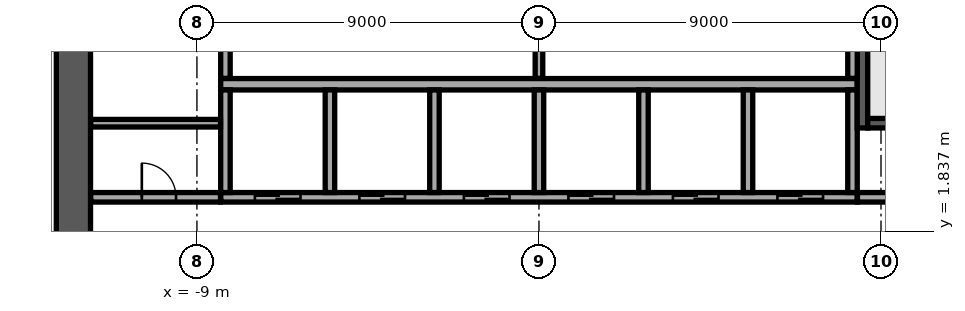
"""IFC4 building model, lengths in metres.
Left out: names, types, materials, properties, quantities, classifications, styles, units other than length and angle.
Written with IfcOpenShell. Run it as: python <this file> out.ifc"""

import sys

from ifc_helpers import new_model, si_unit, direction, frame, frame_2d, origin, place, context, subcontext, project, spatial, rectangle, extrude, element, fill, save


model = new_model("IFC4")
c1 = context("Model", 3, precision=1e-05, world=origin(), true_north=direction((0.0, 1.0)))
c2 = subcontext(c1, "Body", "Model", "MODEL_VIEW")
j1 = project(units=[si_unit("LENGTHUNIT", "METRE"), si_unit("PLANEANGLEUNIT", "RADIAN")], contexts=[c1])
p1 = place(None, origin())
s1 = spatial("IfcSite", under=j1, at=p1, CompositionType="ELEMENT")
p2 = place(p1, origin())
s2 = spatial("IfcBuilding", under=s1, at=p2, CompositionType="ELEMENT")
p3 = place(p2, frame((0.0, 0.0, 217.3)))
s3 = spatial("IfcBuildingStorey", under=s2, at=p3, CompositionType="ELEMENT", Elevation=217.3)
p4 = place(p3, frame((-12.25, -11.8, 0.0), z_axis=(0.0, 0.0, 1.0), x_axis=(0.0, 1.0, 0.0)))
e1 = element("IfcWall", 1, at=p4, inside=s3, PredefinedType="SHEAR", context=c2, shape_type="SweptSolid", body=[
    extrude(rectangle(XDim=23.6, YDim=0.9, at=frame_2d((11.8, 0.0))), origin(), (0.0, 0.0, 1.0), 3.62),
])
p5 = place(p4, frame((10.6, 0.0, 0.0)))
e2 = element("IfcOpeningElement", 2, at=p5, cuts=e1, PredefinedType="OPENING", context=c2, shape_type="SweptSolid", body=[
    extrude(rectangle(XDim=2.4, YDim=2.4, at=frame_2d((1.2, 1.2))), frame((0.0, 0.46, 0.0), z_axis=(0.0, -1.0, 0.0), x_axis=(1.0, 0.0, 0.0)), (0.0, 0.0, 1.0), 0.92),
])
p6 = place(p3, frame((-8.375, 5.7, 0.0), z_axis=(0.0, 0.0, 1.0), x_axis=(1.0, 0.0, 0.0)))
e3 = element("IfcWall", 3, at=p6, inside=s3, PredefinedType="SOLIDWALL", context=c2, shape_type="SweptSolid", body=[
    extrude(rectangle(XDim=16.75, YDim=0.3, at=frame_2d((8.375, 0.0))), origin(), (0.0, 0.0, 1.0), 3.62),
])
p7 = place(p3, frame((-8.375, 2.725, 0.0), z_axis=(0.0, 0.0, 1.0), x_axis=(1.0, 0.0, 0.0)))
e4 = element("IfcWall", 4, at=p7, inside=s3, PredefinedType="SOLIDWALL", context=c2, shape_type="SweptSolid", body=[
    extrude(rectangle(XDim=16.75, YDim=0.25, at=frame_2d((8.375, 0.0))), origin(), (0.0, 0.0, 1.0), 3.62),
])
p8 = place(p7, frame((0.9, 0.0, 0.0)))
e5 = element("IfcOpeningElement", 5, at=p8, cuts=e4, PredefinedType="OPENING", context=c2, shape_type="SweptSolid", body=[
    extrude(rectangle(XDim=1.2, YDim=2.1, at=frame_2d((0.6, 1.05))), frame((0.0, 0.135, 0.0), z_axis=(0.0, -1.0, 0.0), x_axis=(1.0, 0.0, 0.0)), (0.0, 0.0, 1.0), 0.27),
])
p9 = place(p7, frame((3.65, 0.0, 0.0)))
e6 = element("IfcOpeningElement", 6, at=p9, cuts=e4, PredefinedType="OPENING", context=c2, shape_type="SweptSolid", body=[
    extrude(rectangle(XDim=1.2, YDim=2.1, at=frame_2d((0.6, 1.05))), frame((0.0, 0.135, 0.0), z_axis=(0.0, -1.0, 0.0), x_axis=(1.0, 0.0, 0.0)), (0.0, 0.0, 1.0), 0.27),
])
p10 = place(p7, frame((6.4, 0.0, 0.0)))
e7 = element("IfcOpeningElement", 7, at=p10, cuts=e4, PredefinedType="OPENING", context=c2, shape_type="SweptSolid", body=[
    extrude(rectangle(XDim=1.2, YDim=2.1, at=frame_2d((0.6, 1.05))), frame((0.0, 0.135, 0.0), z_axis=(0.0, -1.0, 0.0), x_axis=(1.0, 0.0, 0.0)), (0.0, 0.0, 1.0), 0.27),
])
p11 = place(p7, frame((9.15, 0.0, 0.0)))
e8 = element("IfcOpeningElement", 8, at=p11, cuts=e4, PredefinedType="OPENING", context=c2, shape_type="SweptSolid", body=[
    extrude(rectangle(XDim=1.2, YDim=2.1, at=frame_2d((0.6, 1.05))), frame((0.0, 0.135, 0.0), z_axis=(0.0, -1.0, 0.0), x_axis=(1.0, 0.0, 0.0)), (0.0, 0.0, 1.0), 0.27),
])
p12 = place(p7, frame((11.9, 0.0, 0.0)))
e9 = element("IfcOpeningElement", 9, at=p12, cuts=e4, PredefinedType="OPENING", context=c2, shape_type="SweptSolid", body=[
    extrude(rectangle(XDim=1.2, YDim=2.1, at=frame_2d((0.6, 1.05))), frame((0.0, 0.135, 0.0), z_axis=(0.0, -1.0, 0.0), x_axis=(1.0, 0.0, 0.0)), (0.0, 0.0, 1.0), 0.27),
])
p13 = place(p7, frame((14.65, 0.0, 0.0)))
e10 = element("IfcOpeningElement", 10, at=p13, cuts=e4, PredefinedType="OPENING", context=c2, shape_type="SweptSolid", body=[
    extrude(rectangle(XDim=1.2, YDim=2.1, at=frame_2d((0.6, 1.05))), frame((0.0, 0.135, 0.0), z_axis=(0.0, -1.0, 0.0), x_axis=(1.0, 0.0, 0.0)), (0.0, 0.0, 1.0), 0.27),
])
for number, where, z_axis, x_axis in (
    (11, (-8.25, 2.85, 0.0), (0.0, 0.0, 1.0), (0.0, 1.0, 0.0)),
    (12, (-5.5, 2.85, 0.0), (0.0, 0.0, 1.0), (0.0, 1.0, 0.0)),
    (13, (-2.75, 2.85, 0.0), (0.0, 0.0, 1.0), (0.0, 1.0, 0.0)),
    (14, (0.0, 2.85, 0.0), (0.0, 0.0, 1.0), (0.0, 1.0, 0.0)),
    (15, (2.75, 2.85, 0.0), (0.0, 0.0, 1.0), (0.0, 1.0, 0.0)),
    (16, (5.5, 2.85, 0.0), (0.0, 0.0, 1.0), (0.0, 1.0, 0.0)),
    (17, (8.25, 2.85, 0.0), (0.0, 0.0, 1.0), (0.0, 1.0, 0.0)),
):
    element("IfcWall", number, at=place(p3, frame(where, z_axis=z_axis, x_axis=x_axis)), inside=s3, PredefinedType="SOLIDWALL", context=c2, shape_type="SweptSolid", body=[
        extrude(rectangle(XDim=2.7, YDim=0.25, at=frame_2d((1.35, 0.0))), origin(), (0.0, 0.0, 1.0), 3.62),
    ])
p14 = place(p3, frame((8.512, 4.55, 0.0), z_axis=(0.0, 0.0, 1.0), x_axis=(0.0, 1.0, 0.0)))
e18 = element("IfcWall", 18, at=p14, inside=s3, PredefinedType="SOLIDWALL", context=c2, shape_type="SweptSolid", body=[
    extrude(rectangle(XDim=7.25, YDim=0.275, at=frame_2d((3.625, 0.0))), origin(), (0.0, 0.0, 1.0), 3.62),
])
p15 = place(p14, frame((6.0, 0.0, 0.0)))
e19 = element("IfcOpeningElement", 19, at=p15, cuts=e18, PredefinedType="OPENING", context=c2, shape_type="SweptSolid", body=[
    extrude(rectangle(XDim=1.0, YDim=2.1, at=frame_2d((0.5, 1.05))), frame((0.0, 0.147, 0.0), z_axis=(0.0, -1.0, 0.0), x_axis=(1.0, 0.0, 0.0)), (0.0, 0.0, 1.0), 0.295),
])
p16 = place(p3, frame((8.65, 4.675, 0.0), z_axis=(0.0, 0.0, 1.0), x_axis=(1.0, 0.0, 0.0)))
e20 = element("IfcWall", 20, at=p16, inside=s3, PredefinedType="SOLIDWALL", context=c2, shape_type="SweptSolid", body=[
    extrude(rectangle(XDim=3.15, YDim=0.25, at=frame_2d((1.575, 0.0))), origin(), (0.0, 0.0, 1.0), 3.62),
])
p17 = place(p3, frame((-11.795, 2.725, 0.0), z_axis=(0.0, 0.0, 1.0), x_axis=(1.0, 0.0, 0.0)))
e21 = element("IfcWall", 21, at=p17, inside=s3, PredefinedType="PARTITIONING", context=c2, shape_type="SweptSolid", body=[
    extrude(rectangle(XDim=3.415, YDim=0.25, at=frame_2d((1.708, 0.0))), origin(), (0.0, 0.0, 1.0), 3.62),
])
p18 = place(p17, frame((1.345, 0.0, 0.0)))
e22 = element("IfcOpeningElement", 22, at=p18, cuts=e21, PredefinedType="OPENING", context=c2, shape_type="SweptSolid", body=[
    extrude(rectangle(XDim=0.9, YDim=2.1, at=frame_2d((0.45, 1.05))), frame((0.0, 0.135, 0.0), z_axis=(0.0, -1.0, 0.0), x_axis=(1.0, 0.0, 0.0)), (0.0, 0.0, 1.0), 0.27),
])
p19 = place(p3, frame((8.38, 2.725, 0.0), z_axis=(0.0, 0.0, 1.0), x_axis=(1.0, 0.0, 0.0)))
e23 = element("IfcWall", 23, at=p19, inside=s3, PredefinedType="PARTITIONING", context=c2, shape_type="SweptSolid", body=[
    extrude(rectangle(XDim=3.415, YDim=0.25, at=frame_2d((1.708, 0.0))), origin(), (0.0, 0.0, 1.0), 3.62),
])
p20 = place(p19, frame((1.17, 0.0, 0.0)))
e24 = element("IfcOpeningElement", 24, at=p20, cuts=e23, PredefinedType="OPENING", context=c2, shape_type="SweptSolid", body=[
    extrude(rectangle(XDim=0.9, YDim=2.1, at=frame_2d((0.45, 1.05))), frame((0.0, 0.135, 0.0), z_axis=(0.0, -1.0, 0.0), x_axis=(1.0, 0.0, 0.0)), (0.0, 0.0, 1.0), 0.27),
])
p21 = place(p3, frame((-11.795, 4.675, 0.0), z_axis=(0.0, 0.0, 1.0), x_axis=(1.0, 0.0, 0.0)))
e25 = element("IfcWall", 25, at=p21, inside=s3, PredefinedType="PARTITIONING", context=c2, shape_type="SweptSolid", body=[
    extrude(rectangle(XDim=3.415, YDim=0.2, at=frame_2d((1.708, 0.0))), origin(), (0.0, 0.0, 1.0), 3.62),
])
p22 = place(p3, frame((-8.25, 5.855, 0.0), z_axis=(0.0, 0.0, 1.0), x_axis=(0.0, 1.0, 0.0)))
e26 = element("IfcWall", 26, at=p22, inside=s3, PredefinedType="PARTITIONING", context=c2, shape_type="SweptSolid", body=[
    extrude(rectangle(XDim=2.69, YDim=0.25, at=frame_2d((1.345, 0.0))), origin(), (0.0, 0.0, 1.0), 3.62),
])
p23 = place(p3, frame((0.0, 5.855, 0.0), z_axis=(0.0, 0.0, 1.0), x_axis=(0.0, 1.0, 0.0)))
e27 = element("IfcWall", 27, at=p23, inside=s3, PredefinedType="PARTITIONING", context=c2, shape_type="SweptSolid", body=[
    extrude(rectangle(XDim=2.69, YDim=0.2, at=frame_2d((1.345, 0.0))), origin(), (0.0, 0.0, 1.0), 3.62),
])
p24 = place(p3, frame((8.25, 5.855, 0.0), z_axis=(0.0, 0.0, 1.0), x_axis=(0.0, 1.0, 0.0)))
e28 = element("IfcWall", 28, at=p24, inside=s3, PredefinedType="PARTITIONING", context=c2, shape_type="SweptSolid", body=[
    extrude(rectangle(XDim=2.69, YDim=0.25, at=frame_2d((1.345, 0.0))), origin(), (0.0, 0.0, 1.0), 3.62),
])
p25 = place(p3, frame((-1.962, 34.735, 0.0), z_axis=(0.0, 0.0, 1.0), x_axis=(-0.669133181838, -0.743142506497, 0.0)))
e29 = element("IfcWall", 29, at=p25, inside=s3, PredefinedType="STANDARD", context=c2, shape_type="SweptSolid", body=[
    extrude(rectangle(XDim=49.0, YDim=0.6, at=frame_2d((24.5, 0.0))), origin(), (0.0, 0.0, 1.0), 3.62),
])
p26 = place(p25, frame((1.227, 0.0, 0.9)))
e30 = element("IfcOpeningElement", 30, at=p26, cuts=e29, PredefinedType="OPENING", context=c2, shape_type="SweptSolid", body=[
    extrude(rectangle(XDim=2.0, YDim=2.1, at=frame_2d((1.0, 1.05))), frame((0.0, 0.31, 0.0), z_axis=(0.0, -1.0, 0.0), x_axis=(1.0, 0.0, 0.0)), (0.0, 0.0, 1.0), 0.62),
])
p27 = place(p25, frame((5.682, 0.0, 0.9)))
e31 = element("IfcOpeningElement", 31, at=p27, cuts=e29, PredefinedType="OPENING", context=c2, shape_type="SweptSolid", body=[
    extrude(rectangle(XDim=2.0, YDim=2.1, at=frame_2d((1.0, 1.05))), frame((0.0, 0.31, 0.0), z_axis=(0.0, -1.0, 0.0), x_axis=(1.0, 0.0, 0.0)), (0.0, 0.0, 1.0), 0.62),
])
p28 = place(p25, frame((10.136, 0.0, 0.9)))
e32 = element("IfcOpeningElement", 32, at=p28, cuts=e29, PredefinedType="OPENING", context=c2, shape_type="SweptSolid", body=[
    extrude(rectangle(XDim=2.0, YDim=2.1, at=frame_2d((1.0, 1.05))), frame((0.0, 0.31, 0.0), z_axis=(0.0, -1.0, 0.0), x_axis=(1.0, 0.0, 0.0)), (0.0, 0.0, 1.0), 0.62),
])
p29 = place(p25, frame((14.591, 0.0, 0.9)))
e33 = element("IfcOpeningElement", 33, at=p29, cuts=e29, PredefinedType="OPENING", context=c2, shape_type="SweptSolid", body=[
    extrude(rectangle(XDim=2.0, YDim=2.1, at=frame_2d((1.0, 1.05))), frame((0.0, 0.31, 0.0), z_axis=(0.0, -1.0, 0.0), x_axis=(1.0, 0.0, 0.0)), (0.0, 0.0, 1.0), 0.62),
])
p30 = place(p25, frame((19.045, 0.0, 0.9)))
e34 = element("IfcOpeningElement", 34, at=p30, cuts=e29, PredefinedType="OPENING", context=c2, shape_type="SweptSolid", body=[
    extrude(rectangle(XDim=2.0, YDim=2.1, at=frame_2d((1.0, 1.05))), frame((0.0, 0.31, 0.0), z_axis=(0.0, -1.0, 0.0), x_axis=(1.0, 0.0, 0.0)), (0.0, 0.0, 1.0), 0.62),
])
p31 = place(p25, frame((23.5, 0.0, 0.9)))
e35 = element("IfcOpeningElement", 35, at=p31, cuts=e29, PredefinedType="OPENING", context=c2, shape_type="SweptSolid", body=[
    extrude(rectangle(XDim=2.0, YDim=2.1, at=frame_2d((1.0, 1.05))), frame((0.0, 0.31, 0.0), z_axis=(0.0, -1.0, 0.0), x_axis=(1.0, 0.0, 0.0)), (0.0, 0.0, 1.0), 0.62),
])
p32 = place(p25, frame((27.955, 0.0, 0.9)))
e36 = element("IfcOpeningElement", 36, at=p32, cuts=e29, PredefinedType="OPENING", context=c2, shape_type="SweptSolid", body=[
    extrude(rectangle(XDim=2.0, YDim=2.1, at=frame_2d((1.0, 1.05))), frame((0.0, 0.31, 0.0), z_axis=(0.0, -1.0, 0.0), x_axis=(1.0, 0.0, 0.0)), (0.0, 0.0, 1.0), 0.62),
])
p33 = place(p25, frame((32.409, 0.0, 0.9)))
e37 = element("IfcOpeningElement", 37, at=p33, cuts=e29, PredefinedType="OPENING", context=c2, shape_type="SweptSolid", body=[
    extrude(rectangle(XDim=2.0, YDim=2.1, at=frame_2d((1.0, 1.05))), frame((0.0, 0.31, 0.0), z_axis=(0.0, -1.0, 0.0), x_axis=(1.0, 0.0, 0.0)), (0.0, 0.0, 1.0), 0.62),
])
p34 = place(p25, frame((36.864, 0.0, 0.9)))
e38 = element("IfcOpeningElement", 38, at=p34, cuts=e29, PredefinedType="OPENING", context=c2, shape_type="SweptSolid", body=[
    extrude(rectangle(XDim=2.0, YDim=2.1, at=frame_2d((1.0, 1.05))), frame((0.0, 0.31, 0.0), z_axis=(0.0, -1.0, 0.0), x_axis=(1.0, 0.0, 0.0)), (0.0, 0.0, 1.0), 0.62),
])
p35 = place(p25, frame((41.318, 0.0, 0.9)))
e39 = element("IfcOpeningElement", 39, at=p35, cuts=e29, PredefinedType="OPENING", context=c2, shape_type="SweptSolid", body=[
    extrude(rectangle(XDim=2.0, YDim=2.1, at=frame_2d((1.0, 1.05))), frame((0.0, 0.31, 0.0), z_axis=(0.0, -1.0, 0.0), x_axis=(1.0, 0.0, 0.0)), (0.0, 0.0, 1.0), 0.62),
])
p36 = place(p25, frame((45.773, 0.0, 0.9)))
e40 = element("IfcOpeningElement", 40, at=p36, cuts=e29, PredefinedType="OPENING", context=c2, shape_type="SweptSolid", body=[
    extrude(rectangle(XDim=2.0, YDim=2.1, at=frame_2d((1.0, 1.05))), frame((0.0, 0.31, 0.0), z_axis=(0.0, -1.0, 0.0), x_axis=(1.0, 0.0, 0.0)), (0.0, 0.0, 1.0), 0.62),
])
p37 = place(p3, frame((1.962, -34.735, 0.0), z_axis=(0.0, 0.0, 1.0), x_axis=(0.669133181838, 0.743142506497, 0.0)))
e41 = element("IfcWall", 41, at=p37, inside=s3, PredefinedType="STANDARD", context=c2, shape_type="SweptSolid", body=[
    extrude(rectangle(XDim=49.0, YDim=0.6, at=frame_2d((24.5, 0.0))), origin(), (0.0, 0.0, 1.0), 3.62),
])
p38 = place(p37, frame((1.227, 0.0, 0.9)))
e42 = element("IfcOpeningElement", 42, at=p38, cuts=e41, PredefinedType="OPENING", context=c2, shape_type="SweptSolid", body=[
    extrude(rectangle(XDim=2.0, YDim=2.1, at=frame_2d((1.0, 1.05))), frame((0.0, 0.31, 0.0), z_axis=(0.0, -1.0, 0.0), x_axis=(1.0, 0.0, 0.0)), (0.0, 0.0, 1.0), 0.62),
])
p39 = place(p37, frame((5.682, 0.0, 0.9)))
e43 = element("IfcOpeningElement", 43, at=p39, cuts=e41, PredefinedType="OPENING", context=c2, shape_type="SweptSolid", body=[
    extrude(rectangle(XDim=2.0, YDim=2.1, at=frame_2d((1.0, 1.05))), frame((0.0, 0.31, 0.0), z_axis=(0.0, -1.0, 0.0), x_axis=(1.0, 0.0, 0.0)), (0.0, 0.0, 1.0), 0.62),
])
p40 = place(p37, frame((10.136, 0.0, 0.9)))
e44 = element("IfcOpeningElement", 44, at=p40, cuts=e41, PredefinedType="OPENING", context=c2, shape_type="SweptSolid", body=[
    extrude(rectangle(XDim=2.0, YDim=2.1, at=frame_2d((1.0, 1.05))), frame((0.0, 0.31, 0.0), z_axis=(0.0, -1.0, 0.0), x_axis=(1.0, 0.0, 0.0)), (0.0, 0.0, 1.0), 0.62),
])
p41 = place(p37, frame((14.591, 0.0, 0.9)))
e45 = element("IfcOpeningElement", 45, at=p41, cuts=e41, PredefinedType="OPENING", context=c2, shape_type="SweptSolid", body=[
    extrude(rectangle(XDim=2.0, YDim=2.1, at=frame_2d((1.0, 1.05))), frame((0.0, 0.31, 0.0), z_axis=(0.0, -1.0, 0.0), x_axis=(1.0, 0.0, 0.0)), (0.0, 0.0, 1.0), 0.62),
])
p42 = place(p37, frame((19.045, 0.0, 0.9)))
e46 = element("IfcOpeningElement", 46, at=p42, cuts=e41, PredefinedType="OPENING", context=c2, shape_type="SweptSolid", body=[
    extrude(rectangle(XDim=2.0, YDim=2.1, at=frame_2d((1.0, 1.05))), frame((0.0, 0.31, 0.0), z_axis=(0.0, -1.0, 0.0), x_axis=(1.0, 0.0, 0.0)), (0.0, 0.0, 1.0), 0.62),
])
p43 = place(p37, frame((23.5, 0.0, 0.9)))
e47 = element("IfcOpeningElement", 47, at=p43, cuts=e41, PredefinedType="OPENING", context=c2, shape_type="SweptSolid", body=[
    extrude(rectangle(XDim=2.0, YDim=2.1, at=frame_2d((1.0, 1.05))), frame((0.0, 0.31, 0.0), z_axis=(0.0, -1.0, 0.0), x_axis=(1.0, 0.0, 0.0)), (0.0, 0.0, 1.0), 0.62),
])
p44 = place(p37, frame((27.955, 0.0, 0.9)))
e48 = element("IfcOpeningElement", 48, at=p44, cuts=e41, PredefinedType="OPENING", context=c2, shape_type="SweptSolid", body=[
    extrude(rectangle(XDim=2.0, YDim=2.1, at=frame_2d((1.0, 1.05))), frame((0.0, 0.31, 0.0), z_axis=(0.0, -1.0, 0.0), x_axis=(1.0, 0.0, 0.0)), (0.0, 0.0, 1.0), 0.62),
])
p45 = place(p37, frame((32.409, 0.0, 0.9)))
e49 = element("IfcOpeningElement", 49, at=p45, cuts=e41, PredefinedType="OPENING", context=c2, shape_type="SweptSolid", body=[
    extrude(rectangle(XDim=2.0, YDim=2.1, at=frame_2d((1.0, 1.05))), frame((0.0, 0.31, 0.0), z_axis=(0.0, -1.0, 0.0), x_axis=(1.0, 0.0, 0.0)), (0.0, 0.0, 1.0), 0.62),
])
p46 = place(p37, frame((36.864, 0.0, 0.9)))
e50 = element("IfcOpeningElement", 50, at=p46, cuts=e41, PredefinedType="OPENING", context=c2, shape_type="SweptSolid", body=[
    extrude(rectangle(XDim=2.0, YDim=2.1, at=frame_2d((1.0, 1.05))), frame((0.0, 0.31, 0.0), z_axis=(0.0, -1.0, 0.0), x_axis=(1.0, 0.0, 0.0)), (0.0, 0.0, 1.0), 0.62),
])
p47 = place(p37, frame((41.318, 0.0, 0.9)))
e51 = element("IfcOpeningElement", 51, at=p47, cuts=e41, PredefinedType="OPENING", context=c2, shape_type="SweptSolid", body=[
    extrude(rectangle(XDim=2.0, YDim=2.1, at=frame_2d((1.0, 1.05))), frame((0.0, 0.31, 0.0), z_axis=(0.0, -1.0, 0.0), x_axis=(1.0, 0.0, 0.0)), (0.0, 0.0, 1.0), 0.62),
])
p48 = place(p37, frame((45.773, 0.0, 0.9)))
e52 = element("IfcOpeningElement", 52, at=p48, cuts=e41, PredefinedType="OPENING", context=c2, shape_type="SweptSolid", body=[
    extrude(rectangle(XDim=2.0, YDim=2.1, at=frame_2d((1.0, 1.05))), frame((0.0, 0.31, 0.0), z_axis=(0.0, -1.0, 0.0), x_axis=(1.0, 0.0, 0.0)), (0.0, 0.0, 1.0), 0.62),
])
p49 = place(p3, frame((-24.952, 1.024, 0.0), z_axis=(0.0, 0.0, 1.0), x_axis=(0.66912723064, 0.743147864974, 0.0)))
e53 = element("IfcWall", 53, at=p49, inside=s3, PredefinedType="PARTITIONING", context=c2, shape_type="SweptSolid", body=[
    extrude(rectangle(XDim=31.871, YDim=0.15, at=frame_2d((15.936, 0.0))), origin(), (0.0, 0.0, 1.0), 3.17),
])
p50 = place(p49, frame((16.202, 0.0, 0.0)))
e54 = element("IfcOpeningElement", 54, at=p50, cuts=e53, PredefinedType="OPENING", context=c2, shape_type="SweptSolid", body=[
    extrude(rectangle(XDim=1.0, YDim=2.1, at=frame_2d((0.5, 1.05))), frame((0.0, 0.085, 0.0), z_axis=(0.0, -1.0, 0.0), x_axis=(1.0, 0.0, 0.0)), (0.0, 0.0, 1.0), 0.17),
])
p51 = place(p49, frame((28.08, 0.0, 0.0)))
e55 = element("IfcOpeningElement", 55, at=p51, cuts=e53, PredefinedType="OPENING", context=c2, shape_type="SweptSolid", body=[
    extrude(rectangle(XDim=1.8, YDim=2.1, at=frame_2d((0.9, 1.05))), frame((0.0, 0.085, 0.0), z_axis=(0.0, -1.0, 0.0), x_axis=(1.0, 0.0, 0.0)), (0.0, 0.0, 1.0), 0.17),
])
p52 = place(p49, frame((22.58, 0.0, 0.0)))
e56 = element("IfcOpeningElement", 56, at=p52, cuts=e53, PredefinedType="OPENING", context=c2, shape_type="SweptSolid", body=[
    extrude(rectangle(XDim=1.0, YDim=2.1, at=frame_2d((0.5, 1.05))), frame((0.0, 0.085, 0.0), z_axis=(0.0, -1.0, 0.0), x_axis=(1.0, 0.0, 0.0)), (0.0, 0.0, 1.0), 0.17),
])
p53 = place(p8, origin())
e57 = element("IfcDoor", 57, at=p53, inside=s3, OperationType="DOUBLE_DOOR_SLIDING", PredefinedType="DOOR", context=c2, shape_type="SweptSolid", body=[
    extrude(rectangle(XDim=1.2, YDim=2.1, at=frame_2d((0.6, 1.05))), frame((0.0, 0.025, 0.0), z_axis=(0.0, -1.0, 0.0), x_axis=(1.0, 0.0, 0.0)), (0.0, 0.0, 1.0), 0.05),
])
fill(e5, e57)
p54 = place(p9, origin())
e58 = element("IfcDoor", 58, at=p54, inside=s3, OperationType="DOUBLE_DOOR_SLIDING", PredefinedType="DOOR", context=c2, shape_type="SweptSolid", body=[
    extrude(rectangle(XDim=1.2, YDim=2.1, at=frame_2d((0.6, 1.05))), frame((0.0, 0.025, 0.0), z_axis=(0.0, -1.0, 0.0), x_axis=(1.0, 0.0, 0.0)), (0.0, 0.0, 1.0), 0.05),
])
fill(e6, e58)
p55 = place(p10, origin())
e59 = element("IfcDoor", 59, at=p55, inside=s3, OperationType="DOUBLE_DOOR_SLIDING", PredefinedType="DOOR", context=c2, shape_type="SweptSolid", body=[
    extrude(rectangle(XDim=1.2, YDim=2.1, at=frame_2d((0.6, 1.05))), frame((0.0, 0.025, 0.0), z_axis=(0.0, -1.0, 0.0), x_axis=(1.0, 0.0, 0.0)), (0.0, 0.0, 1.0), 0.05),
])
fill(e7, e59)
p56 = place(p11, origin())
e60 = element("IfcDoor", 60, at=p56, inside=s3, OperationType="DOUBLE_DOOR_SLIDING", PredefinedType="DOOR", context=c2, shape_type="SweptSolid", body=[
    extrude(rectangle(XDim=1.2, YDim=2.1, at=frame_2d((0.6, 1.05))), frame((0.0, 0.025, 0.0), z_axis=(0.0, -1.0, 0.0), x_axis=(1.0, 0.0, 0.0)), (0.0, 0.0, 1.0), 0.05),
])
fill(e8, e60)
p57 = place(p12, origin())
e61 = element("IfcDoor", 61, at=p57, inside=s3, OperationType="DOUBLE_DOOR_SLIDING", PredefinedType="DOOR", context=c2, shape_type="SweptSolid", body=[
    extrude(rectangle(XDim=1.2, YDim=2.1, at=frame_2d((0.6, 1.05))), frame((0.0, 0.025, 0.0), z_axis=(0.0, -1.0, 0.0), x_axis=(1.0, 0.0, 0.0)), (0.0, 0.0, 1.0), 0.05),
])
fill(e9, e61)
p58 = place(p13, origin())
e62 = element("IfcDoor", 62, at=p58, inside=s3, OperationType="DOUBLE_DOOR_SLIDING", PredefinedType="DOOR", context=c2, shape_type="SweptSolid", body=[
    extrude(rectangle(XDim=1.2, YDim=2.1, at=frame_2d((0.6, 1.05))), frame((0.0, 0.025, 0.0), z_axis=(0.0, -1.0, 0.0), x_axis=(1.0, 0.0, 0.0)), (0.0, 0.0, 1.0), 0.05),
])
fill(e10, e62)
p59 = place(p18, origin())
e63 = element("IfcDoor", 63, at=p59, inside=s3, OperationType="SINGLE_SWING_RIGHT", PredefinedType="DOOR", context=c2, shape_type="SweptSolid", body=[
    extrude(rectangle(XDim=0.9, YDim=2.1, at=frame_2d((0.45, 1.05))), frame((0.0, 0.025, 0.0), z_axis=(0.0, -1.0, 0.0), x_axis=(1.0, 0.0, 0.0)), (0.0, 0.0, 1.0), 0.05),
])
fill(e22, e63)
save(model, sys.argv[1])
